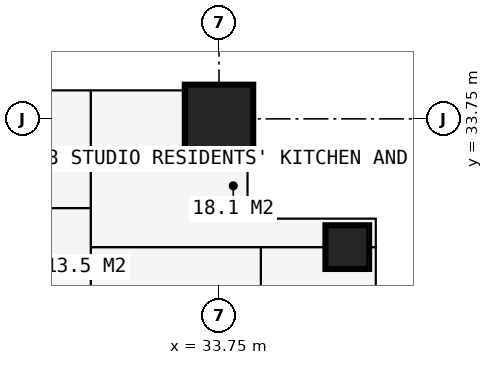
"""IFC4 building model, lengths in metres.
Left out: names, types, materials, properties, quantities, classifications, styles, units other than length and angle.
Written with IfcOpenShell. Run it as: python <this file> out.ifc"""

import sys

from ifc_helpers import new_model, si_unit, direction, frame, frame_2d, origin, origin_2d, place, context, subcontext, project, spatial, rectangle, extrude, element, fill, save


model = new_model("IFC4")
c1 = context("Model", 3, precision=1e-05, world=origin(), true_north=direction((0.0, 1.0)))
c2 = subcontext(c1, "Body", "Model", "MODEL_VIEW")
j1 = project(units=[si_unit("LENGTHUNIT", "METRE"), si_unit("PLANEANGLEUNIT", "RADIAN")], contexts=[c1])
p1 = place(None, origin())
s1 = spatial("IfcSite", under=j1, at=p1, CompositionType="ELEMENT")
p2 = place(p1, origin())
s2 = spatial("IfcBuilding", under=s1, at=p2, CompositionType="ELEMENT")
p3 = place(p2, frame((0.0, 0.0, 80.1)))
s3 = spatial("IfcBuildingStorey", under=s2, at=p3, CompositionType="ELEMENT", Elevation=80.1)
p4 = place(p3, frame((33.75, 33.75, 0.0), z_axis=(0.0, 0.0, 1.0), x_axis=(1.0, 0.0, 0.0)))
e1 = element("IfcColumn", 1, at=p4, inside=s3, PredefinedType="COLUMN", context=c2, shape_type="SweptSolid", body=[
    extrude(rectangle(XDim=1.8, YDim=1.8, at=origin_2d()), origin(), (0.0, 0.0, 1.0), 3.6),
])
p5 = place(p3, frame((37.125, 30.375, 0.0), z_axis=(0.0, 0.0, 1.0), x_axis=(1.0, 0.0, 0.0)))
e2 = element("IfcColumn", 2, at=p5, inside=s3, PredefinedType="COLUMN", context=c2, shape_type="SweptSolid", body=[
    extrude(rectangle(XDim=1.15, YDim=1.15, at=origin_2d()), origin(), (0.0, 0.0, 1.0), 3.6),
])
p6 = place(p3, frame((37.875, 27.75, 0.0), z_axis=(0.0, 0.0, 1.0), x_axis=(0.0, 1.0, 0.0)))
e3 = element("IfcWall", 3, at=p6, inside=s3, PredefinedType="SOLIDWALL", context=c2, shape_type="SweptSolid", body=[
    extrude(rectangle(XDim=3.375, YDim=0.3, at=frame_2d((1.688, 0.0))), origin(), (0.0, 0.0, 1.0), 3.375),
])
p7 = place(p6, frame((0.788, 0.0, 0.6)))
e4 = element("IfcOpeningElement", 4, at=p7, cuts=e3, PredefinedType="OPENING", context=c2, shape_type="SweptSolid", body=[
    extrude(rectangle(XDim=1.8, YDim=2.1, at=frame_2d((0.9, 1.05))), frame((0.0, 0.16, 0.0), z_axis=(0.0, -1.0, 0.0), x_axis=(1.0, 0.0, 0.0)), (0.0, 0.0, 1.0), 0.32),
])
p8 = place(p3, frame((37.875, 31.125, 0.0), z_axis=(0.0, 0.0, 1.0), x_axis=(-1.0, 0.0, 0.0)))
e5 = element("IfcWall", 5, at=p8, inside=s3, PredefinedType="SOLIDWALL", context=c2, shape_type="SweptSolid", body=[
    extrude(rectangle(XDim=3.375, YDim=0.3, at=frame_2d((1.688, 0.0))), origin(), (0.0, 0.0, 1.0), 3.375),
])
p9 = place(p8, frame((0.788, 0.0, 0.6)))
e6 = element("IfcOpeningElement", 6, at=p9, cuts=e5, PredefinedType="OPENING", context=c2, shape_type="SweptSolid", body=[
    extrude(rectangle(XDim=1.8, YDim=2.1, at=frame_2d((0.9, 1.05))), frame((0.0, 0.16, 0.0), z_axis=(0.0, -1.0, 0.0), x_axis=(1.0, 0.0, 0.0)), (0.0, 0.0, 1.0), 0.32),
])
p10 = place(p3, frame((34.5, 31.125, 0.0), z_axis=(0.0, 0.0, 1.0), x_axis=(0.0, 1.0, 0.0)))
e7 = element("IfcWall", 7, at=p10, inside=s3, PredefinedType="SOLIDWALL", context=c2, shape_type="SweptSolid", body=[
    extrude(rectangle(XDim=3.375, YDim=0.3, at=frame_2d((1.688, 0.0))), origin(), (0.0, 0.0, 1.0), 3.375),
])
p11 = place(p10, frame((0.272, 0.0, 0.9)))
e8 = element("IfcOpeningElement", 8, at=p11, cuts=e7, PredefinedType="OPENING", context=c2, shape_type="SweptSolid", body=[
    extrude(rectangle(XDim=0.9, YDim=1.8, at=frame_2d((0.45, 0.9))), frame((0.0, 0.16, 0.0), z_axis=(0.0, -1.0, 0.0), x_axis=(1.0, 0.0, 0.0)), (0.0, 0.0, 1.0), 0.32),
])
p12 = place(p3, frame((28.375, 31.4, 0.0), z_axis=(0.0, 0.0, 1.0), x_axis=(1.0, 0.0, 0.0)))
e9 = element("IfcWall", 9, at=p12, inside=s3, PredefinedType="PARTITIONING", context=c2, shape_type="SweptSolid", body=[
    extrude(rectangle(XDim=2.0, YDim=0.1, at=frame_2d((1.0, 0.0))), origin(), (0.0, 0.0, 1.0), 3.375),
])
p13 = place(p3, frame((30.375, 29.2, 0.0), z_axis=(0.0, 0.0, 1.0), x_axis=(0.0, 1.0, 0.0)))
e10 = element("IfcWall", 10, at=p13, inside=s3, PredefinedType="PARTITIONING", context=c2, shape_type="SweptSolid", body=[
    extrude(rectangle(XDim=5.284, YDim=0.15, at=frame_2d((2.642, 0.0))), origin(), (0.0, 0.0, 1.0), 3.375),
])
p14 = place(p3, frame((30.375, 30.375, 0.0), z_axis=(0.0, 0.0, 1.0), x_axis=(1.0, 0.0, 0.0)))
e11 = element("IfcWall", 11, at=p14, inside=s3, PredefinedType="PARTITIONING", context=c2, shape_type="SweptSolid", body=[
    extrude(rectangle(XDim=7.35, YDim=0.15, at=frame_2d((3.675, 0.0))), origin(), (0.0, 0.0, 1.0), 2.877),
])
p15 = place(p14, frame((5.125, 0.0, 0.0)))
e12 = element("IfcOpeningElement", 12, at=p15, cuts=e11, PredefinedType="OPENING", context=c2, shape_type="SweptSolid", body=[
    extrude(rectangle(XDim=1.0, YDim=2.2, at=frame_2d((0.5, 1.1))), frame((0.0, 0.085, 0.0), z_axis=(0.0, -1.0, 0.0), x_axis=(1.0, 0.0, 0.0)), (0.0, 0.0, 1.0), 0.17),
])
p16 = place(p3, frame((33.75, 32.57, 0.0), z_axis=(0.0, 0.0, 1.0), x_axis=(0.0, 1.0, 0.0)))
e13 = element("IfcWall", 13, at=p16, inside=s3, PredefinedType="PARTITIONING", context=c2, shape_type="SweptSolid", body=[
    extrude(rectangle(XDim=1.914, YDim=0.15, at=frame_2d((0.957, 0.0))), origin(), (0.0, 0.0, 1.0), 2.877),
])
p17 = place(p3, frame((33.75, 32.57, 0.0), z_axis=(0.0, 0.0, 1.0), x_axis=(1.0, 0.0, 0.0)))
e14 = element("IfcWall", 14, at=p17, inside=s3, PredefinedType="PARTITIONING", context=c2, shape_type="SweptSolid", body=[
    extrude(rectangle(XDim=0.734, YDim=0.15, at=frame_2d((0.367, 0.0))), origin(), (0.0, 0.0, 1.0), 3.375),
])
p18 = place(p3, frame((34.85, 12.55, 0.0), z_axis=(0.0, 0.0, 1.0), x_axis=(0.0, 1.0, 0.0)))
e15 = element("IfcWall", 15, at=p18, inside=s3, PredefinedType="PARTITIONING", context=c2, shape_type="SweptSolid", body=[
    extrude(rectangle(XDim=17.825, YDim=0.15, at=frame_2d((8.913, 0.0))), origin(), (0.0, 0.0, 1.0), 3.375),
])
p19 = place(p18, frame((8.6, 0.0, 0.0)))
e16 = element("IfcOpeningElement", 16, at=p19, cuts=e15, PredefinedType="OPENING", context=c2, shape_type="SweptSolid", body=[
    extrude(rectangle(XDim=0.95, YDim=2.2, at=frame_2d((0.475, 1.1))), frame((0.0, 0.085, 0.0), z_axis=(0.0, -1.0, 0.0), x_axis=(1.0, 0.0, 0.0)), (0.0, 0.0, 1.0), 0.17),
])
p20 = place(p7, origin())
e17 = element("IfcWindow", 17, at=p20, inside=s3, PartitioningType="SINGLE_PANEL", PredefinedType="WINDOW", context=c2, shape_type="SweptSolid", body=[
    extrude(rectangle(XDim=1.8, YDim=2.1, at=frame_2d((0.9, 1.05))), frame((0.0, 0.03, 0.0), z_axis=(0.0, -1.0, 0.0), x_axis=(1.0, 0.0, 0.0)), (0.0, 0.0, 1.0), 0.06),
])
fill(e4, e17)
p21 = place(p9, origin())
e18 = element("IfcWindow", 18, at=p21, inside=s3, PartitioningType="SINGLE_PANEL", PredefinedType="WINDOW", context=c2, shape_type="SweptSolid", body=[
    extrude(rectangle(XDim=1.8, YDim=2.1, at=frame_2d((0.9, 1.05))), frame((0.0, 0.03, 0.0), z_axis=(0.0, -1.0, 0.0), x_axis=(1.0, 0.0, 0.0)), (0.0, 0.0, 1.0), 0.06),
])
fill(e6, e18)
p22 = place(p11, origin())
e19 = element("IfcWindow", 19, at=p22, inside=s3, PartitioningType="SINGLE_PANEL", PredefinedType="WINDOW", context=c2, shape_type="SweptSolid", body=[
    extrude(rectangle(XDim=0.9, YDim=1.8, at=frame_2d((0.45, 0.9))), frame((0.0, 0.03, 0.0), z_axis=(0.0, -1.0, 0.0), x_axis=(1.0, 0.0, 0.0)), (0.0, 0.0, 1.0), 0.06),
])
fill(e8, e19)
p23 = place(p15, origin())
e20 = element("IfcDoor", 20, at=p23, inside=s3, OperationType="SINGLE_SWING_LEFT", PredefinedType="DOOR", context=c2, shape_type="SweptSolid", body=[
    extrude(rectangle(XDim=1.0, YDim=2.2, at=frame_2d((0.5, 1.1))), frame((0.0, 0.025, 0.0), z_axis=(0.0, -1.0, 0.0), x_axis=(1.0, 0.0, 0.0)), (0.0, 0.0, 1.0), 0.05),
])
fill(e12, e20)
save(model, sys.argv[1])
